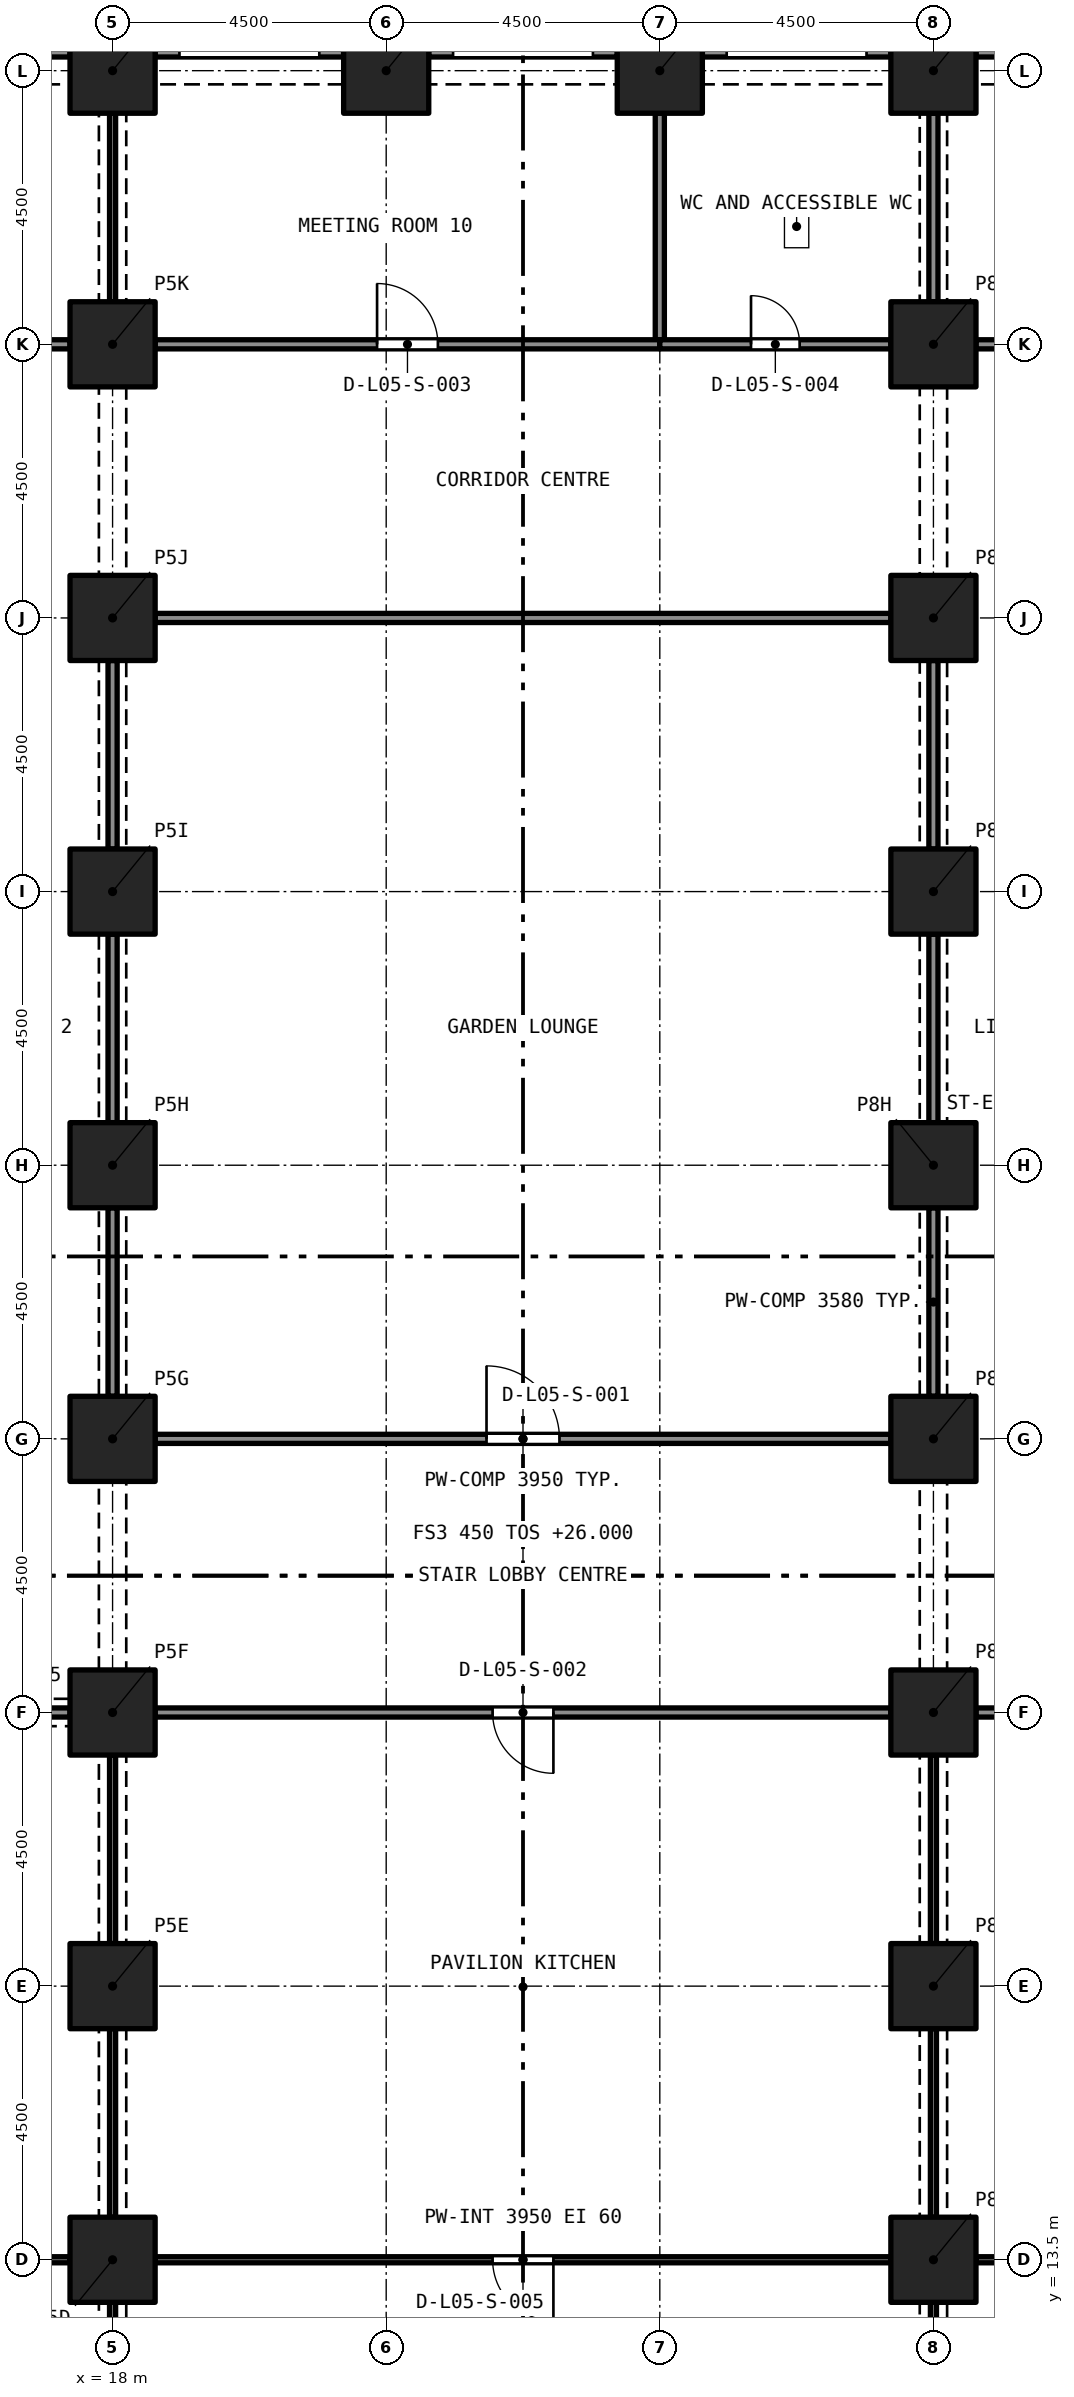
"""IFC4 building model, lengths in metres.
Left out: names, types, materials, properties, quantities, classifications, styles, units other than length and angle.
Written with IfcOpenShell. Run it as: python <this file> out.ifc"""

import sys

from ifc_helpers import new_model, si_unit, direction, frame, frame_2d, origin, origin_2d, place, context, subcontext, project, spatial, rectangle, extrude, element, fill, save


model = new_model("IFC4")
c1 = context("Model", 3, precision=1e-05, world=origin(), true_north=direction((0.0, 1.0)))
c2 = subcontext(c1, "Body", "Model", "MODEL_VIEW")
j1 = project(units=[si_unit("LENGTHUNIT", "METRE"), si_unit("PLANEANGLEUNIT", "RADIAN")], contexts=[c1])
p1 = place(None, origin())
s1 = spatial("IfcSite", under=j1, at=p1, CompositionType="ELEMENT")
p2 = place(p1, origin())
s2 = spatial("IfcBuilding", under=s1, at=p2, CompositionType="ELEMENT")
p3 = place(p2, frame((0.0, 0.0, 26.0)))
s3 = spatial("IfcBuildingStorey", under=s2, at=p3, CompositionType="ELEMENT", Elevation=26.0)
for number, where, z_axis, x_axis in (
    (1, (18.0, 13.5, 0.0), (0.0, 0.0, 1.0), (1.0, 0.0, 0.0)),
    (2, (31.5, 13.5, 0.0), (0.0, 0.0, 1.0), (1.0, 0.0, 0.0)),
    (3, (18.0, 18.0, 0.0), (0.0, 0.0, 1.0), (1.0, 0.0, 0.0)),
    (4, (31.5, 18.0, 0.0), (0.0, 0.0, 1.0), (1.0, 0.0, 0.0)),
    (5, (18.0, 22.5, 0.0), (0.0, 0.0, 1.0), (1.0, 0.0, 0.0)),
    (6, (31.5, 22.5, 0.0), (0.0, 0.0, 1.0), (1.0, 0.0, 0.0)),
    (7, (18.0, 27.0, 0.0), (0.0, 0.0, 1.0), (1.0, 0.0, 0.0)),
    (8, (31.5, 27.0, 0.0), (0.0, 0.0, 1.0), (1.0, 0.0, 0.0)),
    (9, (18.0, 31.5, 0.0), (0.0, 0.0, 1.0), (1.0, 0.0, 0.0)),
    (10, (31.5, 31.5, 0.0), (0.0, 0.0, 1.0), (1.0, 0.0, 0.0)),
    (11, (18.0, 36.0, 0.0), (0.0, 0.0, 1.0), (1.0, 0.0, 0.0)),
    (12, (31.5, 36.0, 0.0), (0.0, 0.0, 1.0), (1.0, 0.0, 0.0)),
    (13, (18.0, 40.5, 0.0), (0.0, 0.0, 1.0), (1.0, 0.0, 0.0)),
    (14, (31.5, 40.5, 0.0), (0.0, 0.0, 1.0), (1.0, 0.0, 0.0)),
    (15, (18.0, 45.0, 0.0), (0.0, 0.0, 1.0), (1.0, 0.0, 0.0)),
    (16, (31.5, 45.0, 0.0), (0.0, 0.0, 1.0), (1.0, 0.0, 0.0)),
    (17, (18.0, 49.5, 0.0), (0.0, 0.0, 1.0), (1.0, 0.0, 0.0)),
    (18, (22.5, 49.5, 0.0), (0.0, 0.0, 1.0), (1.0, 0.0, 0.0)),
    (19, (27.0, 49.5, 0.0), (0.0, 0.0, 1.0), (1.0, 0.0, 0.0)),
    (20, (31.5, 49.5, 0.0), (0.0, 0.0, 1.0), (1.0, 0.0, 0.0)),
):
    element("IfcColumn", number, at=place(p3, frame(where, z_axis=z_axis, x_axis=x_axis)), inside=s3, PredefinedType="COLUMN", context=c2, shape_type="SweptSolid", body=[
        extrude(rectangle(XDim=1.4, YDim=1.4, at=origin_2d()), origin(), (0.0, 0.0, 1.0), 4.4),
    ])
p4 = place(p3, frame((32.2, 49.875, 0.0), z_axis=(0.0, 0.0, 1.0), x_axis=(1.0, 0.0, 0.0)))
e21 = element("IfcWall", 21, at=p4, inside=s3, PredefinedType="SOLIDWALL", context=c2, shape_type="SweptSolid", body=[
    extrude(rectangle(XDim=3.1, YDim=0.3, at=frame_2d((1.55, 0.0))), origin(), (0.0, 0.0, 1.0), 4.4),
])
p5 = place(p4, frame((0.4, 0.0, 0.45)))
e22 = element("IfcOpeningElement", 22, at=p5, cuts=e21, PredefinedType="OPENING", context=c2, shape_type="SweptSolid", body=[
    extrude(rectangle(XDim=2.3, YDim=2.55, at=frame_2d((1.15, 1.275))), frame((0.0, 0.16, 0.0), z_axis=(0.0, -1.0, 0.0), x_axis=(1.0, 0.0, 0.0)), (0.0, 0.0, 1.0), 0.32),
])
p6 = place(p3, frame((27.7, 49.875, 0.0), z_axis=(0.0, 0.0, 1.0), x_axis=(1.0, 0.0, 0.0)))
e23 = element("IfcWall", 23, at=p6, inside=s3, PredefinedType="SOLIDWALL", context=c2, shape_type="SweptSolid", body=[
    extrude(rectangle(XDim=3.1, YDim=0.3, at=frame_2d((1.55, 0.0))), origin(), (0.0, 0.0, 1.0), 4.4),
])
p7 = place(p6, frame((0.4, 0.0, 0.45)))
e24 = element("IfcOpeningElement", 24, at=p7, cuts=e23, PredefinedType="OPENING", context=c2, shape_type="SweptSolid", body=[
    extrude(rectangle(XDim=2.3, YDim=2.55, at=frame_2d((1.15, 1.275))), frame((0.0, 0.16, 0.0), z_axis=(0.0, -1.0, 0.0), x_axis=(1.0, 0.0, 0.0)), (0.0, 0.0, 1.0), 0.32),
])
p8 = place(p3, frame((23.2, 49.875, 0.0), z_axis=(0.0, 0.0, 1.0), x_axis=(1.0, 0.0, 0.0)))
e25 = element("IfcWall", 25, at=p8, inside=s3, PredefinedType="SOLIDWALL", context=c2, shape_type="SweptSolid", body=[
    extrude(rectangle(XDim=3.1, YDim=0.3, at=frame_2d((1.55, 0.0))), origin(), (0.0, 0.0, 1.0), 4.4),
])
p9 = place(p8, frame((0.4, 0.0, 0.45)))
e26 = element("IfcOpeningElement", 26, at=p9, cuts=e25, PredefinedType="OPENING", context=c2, shape_type="SweptSolid", body=[
    extrude(rectangle(XDim=2.3, YDim=2.55, at=frame_2d((1.15, 1.275))), frame((0.0, 0.16, 0.0), z_axis=(0.0, -1.0, 0.0), x_axis=(1.0, 0.0, 0.0)), (0.0, 0.0, 1.0), 0.32),
])
p10 = place(p3, frame((18.7, 49.875, 0.0), z_axis=(0.0, 0.0, 1.0), x_axis=(1.0, 0.0, 0.0)))
e27 = element("IfcWall", 27, at=p10, inside=s3, PredefinedType="SOLIDWALL", context=c2, shape_type="SweptSolid", body=[
    extrude(rectangle(XDim=3.1, YDim=0.3, at=frame_2d((1.55, 0.0))), origin(), (0.0, 0.0, 1.0), 4.4),
])
p11 = place(p10, frame((0.4, 0.0, 0.45)))
e28 = element("IfcOpeningElement", 28, at=p11, cuts=e27, PredefinedType="OPENING", context=c2, shape_type="SweptSolid", body=[
    extrude(rectangle(XDim=2.3, YDim=2.55, at=frame_2d((1.15, 1.275))), frame((0.0, 0.16, 0.0), z_axis=(0.0, -1.0, 0.0), x_axis=(1.0, 0.0, 0.0)), (0.0, 0.0, 1.0), 0.32),
])
p12 = place(p3, frame((14.2, 49.875, 0.0), z_axis=(0.0, 0.0, 1.0), x_axis=(1.0, 0.0, 0.0)))
e29 = element("IfcWall", 29, at=p12, inside=s3, PredefinedType="SOLIDWALL", context=c2, shape_type="SweptSolid", body=[
    extrude(rectangle(XDim=3.1, YDim=0.3, at=frame_2d((1.55, 0.0))), origin(), (0.0, 0.0, 1.0), 4.4),
])
p13 = place(p12, frame((0.4, 0.0, 0.45)))
e30 = element("IfcOpeningElement", 30, at=p13, cuts=e29, PredefinedType="OPENING", context=c2, shape_type="SweptSolid", body=[
    extrude(rectangle(XDim=2.3, YDim=2.55, at=frame_2d((1.15, 1.275))), frame((0.0, 0.16, 0.0), z_axis=(0.0, -1.0, 0.0), x_axis=(1.0, 0.0, 0.0)), (0.0, 0.0, 1.0), 0.32),
])
p14 = place(p3, frame((18.7, 27.0, 0.0), z_axis=(0.0, 0.0, 1.0), x_axis=(1.0, 0.0, 0.0)))
e31 = element("IfcWall", 31, at=p14, inside=s3, PredefinedType="PARTITIONING", context=c2, shape_type="SweptSolid", body=[
    extrude(rectangle(XDim=12.1, YDim=0.15, at=frame_2d((6.05, 0.0))), origin(), (0.0, 0.0, 1.0), 3.95),
])
p15 = place(p14, frame((5.45, 0.0, 0.0)))
e32 = element("IfcOpeningElement", 32, at=p15, cuts=e31, PredefinedType="OPENING", context=c2, shape_type="SweptSolid", body=[
    extrude(rectangle(XDim=1.2, YDim=2.1, at=frame_2d((0.6, 1.05))), frame((0.0, 0.085, 0.0), z_axis=(0.0, -1.0, 0.0), x_axis=(1.0, 0.0, 0.0)), (0.0, 0.0, 1.0), 0.17),
])
p16 = place(p3, frame((30.8, 22.5, 0.0), z_axis=(0.0, 0.0, 1.0), x_axis=(-1.0, 0.0, 0.0)))
e33 = element("IfcWall", 33, at=p16, inside=s3, PredefinedType="PARTITIONING", context=c2, shape_type="SweptSolid", body=[
    extrude(rectangle(XDim=12.1, YDim=0.15, at=frame_2d((6.05, 0.0))), origin(), (0.0, 0.0, 1.0), 3.95),
])
p17 = place(p16, frame((5.55, 0.0, 0.0)))
e34 = element("IfcOpeningElement", 34, at=p17, cuts=e33, PredefinedType="OPENING", context=c2, shape_type="SweptSolid", body=[
    extrude(rectangle(XDim=1.0, YDim=2.1, at=frame_2d((0.5, 1.05))), frame((0.0, 0.085, 0.0), z_axis=(0.0, -1.0, 0.0), x_axis=(1.0, 0.0, 0.0)), (0.0, 0.0, 1.0), 0.17),
])
p18 = place(p3, frame((18.7, 40.5, 0.0), z_axis=(0.0, 0.0, 1.0), x_axis=(1.0, 0.0, 0.0)))
e35 = element("IfcWall", 35, at=p18, inside=s3, PredefinedType="PARTITIONING", context=c2, shape_type="SweptSolid", body=[
    extrude(rectangle(XDim=12.1, YDim=0.15, at=frame_2d((6.05, 0.0))), origin(), (0.0, 0.0, 1.0), 3.95),
])
for number, where, z_axis, x_axis in (
    (36, (31.5, 36.7, 0.0), (0.0, 0.0, 1.0), (0.0, 1.0, 0.0)),
    (37, (31.5, 32.2, 0.0), (0.0, 0.0, 1.0), (0.0, 1.0, 0.0)),
    (38, (31.5, 27.7, 0.0), (0.0, 0.0, 1.0), (0.0, 1.0, 0.0)),
    (39, (18.0, 27.7, 0.0), (0.0, 0.0, 1.0), (0.0, 1.0, 0.0)),
    (40, (18.0, 32.2, 0.0), (0.0, 0.0, 1.0), (0.0, 1.0, 0.0)),
    (41, (18.0, 36.7, 0.0), (0.0, 0.0, 1.0), (0.0, 1.0, 0.0)),
):
    element("IfcWall", number, at=place(p3, frame(where, z_axis=z_axis, x_axis=x_axis)), inside=s3, PredefinedType="PARTITIONING", context=c2, shape_type="SweptSolid", body=[
        extrude(rectangle(XDim=3.1, YDim=0.15, at=frame_2d((1.55, 0.0))), origin(), (0.0, 0.0, 1.0), 3.58),
    ])
p19 = place(p3, frame((27.0, 45.075, 0.0), z_axis=(0.0, 0.0, 1.0), x_axis=(0.0, 1.0, 0.0)))
e42 = element("IfcWall", 42, at=p19, inside=s3, PredefinedType="PARTITIONING", context=c2, shape_type="SweptSolid", body=[
    extrude(rectangle(XDim=3.725, YDim=0.15, at=frame_2d((1.863, 0.0))), origin(), (0.0, 0.0, 1.0), 3.95),
])
p20 = place(p3, frame((18.7, 45.0, 0.0), z_axis=(0.0, 0.0, 1.0), x_axis=(1.0, 0.0, 0.0)))
e43 = element("IfcWall", 43, at=p20, inside=s3, PredefinedType="PARTITIONING", context=c2, shape_type="SweptSolid", body=[
    extrude(rectangle(XDim=8.3, YDim=0.15, at=frame_2d((4.15, 0.0))), origin(), (0.0, 0.0, 1.0), 3.95),
])
p21 = place(p20, frame((3.65, 0.0, 0.0)))
e44 = element("IfcOpeningElement", 44, at=p21, cuts=e43, PredefinedType="OPENING", context=c2, shape_type="SweptSolid", body=[
    extrude(rectangle(XDim=1.0, YDim=2.1, at=frame_2d((0.5, 1.05))), frame((0.0, 0.085, 0.0), z_axis=(0.0, -1.0, 0.0), x_axis=(1.0, 0.0, 0.0)), (0.0, 0.0, 1.0), 0.17),
])
p22 = place(p3, frame((18.0, 45.7, 0.0), z_axis=(0.0, 0.0, 1.0), x_axis=(0.0, 1.0, 0.0)))
e45 = element("IfcWall", 45, at=p22, inside=s3, PredefinedType="PARTITIONING", context=c2, shape_type="SweptSolid", body=[
    extrude(rectangle(XDim=3.1, YDim=0.1, at=frame_2d((1.55, 0.0))), origin(), (0.0, 0.0, 1.0), 3.58),
])
p23 = place(p3, frame((27.0, 45.0, 0.0), z_axis=(0.0, 0.0, 1.0), x_axis=(1.0, 0.0, 0.0)))
e46 = element("IfcWall", 46, at=p23, inside=s3, PredefinedType="PARTITIONING", context=c2, shape_type="SweptSolid", body=[
    extrude(rectangle(XDim=3.8, YDim=0.15, at=frame_2d((1.9, 0.0))), origin(), (0.0, 0.0, 1.0), 3.95),
])
p24 = place(p23, frame((1.5, 0.0, 0.0)))
e47 = element("IfcOpeningElement", 47, at=p24, cuts=e46, PredefinedType="OPENING", context=c2, shape_type="SweptSolid", body=[
    extrude(rectangle(XDim=0.8, YDim=2.1, at=frame_2d((0.4, 1.05))), frame((0.0, 0.085, 0.0), z_axis=(0.0, -1.0, 0.0), x_axis=(1.0, 0.0, 0.0)), (0.0, 0.0, 1.0), 0.17),
])
p25 = place(p3, frame((31.5, 45.7, 0.0), z_axis=(0.0, 0.0, 1.0), x_axis=(0.0, 1.0, 0.0)))
e48 = element("IfcWall", 48, at=p25, inside=s3, PredefinedType="PARTITIONING", context=c2, shape_type="SweptSolid", body=[
    extrude(rectangle(XDim=3.1, YDim=0.15, at=frame_2d((1.55, 0.0))), origin(), (0.0, 0.0, 1.0), 3.58),
])
p26 = place(p3, frame((30.8, 13.5, 0.0), z_axis=(0.0, 0.0, 1.0), x_axis=(-1.0, 0.0, 0.0)))
e49 = element("IfcWall", 49, at=p26, inside=s3, PredefinedType="PARTITIONING", context=c2, shape_type="SweptSolid", body=[
    extrude(rectangle(XDim=12.1, YDim=0.1, at=frame_2d((6.05, 0.0))), origin(), (0.0, 0.0, 1.0), 3.95),
])
p27 = place(p26, frame((5.55, 0.0, 0.0)))
e50 = element("IfcOpeningElement", 50, at=p27, cuts=e49, PredefinedType="OPENING", context=c2, shape_type="SweptSolid", body=[
    extrude(rectangle(XDim=1.0, YDim=2.1, at=frame_2d((0.5, 1.05))), frame((0.0, 0.06, 0.0), z_axis=(0.0, -1.0, 0.0), x_axis=(1.0, 0.0, 0.0)), (0.0, 0.0, 1.0), 0.12),
])
for number, where, z_axis, x_axis in (
    (51, (31.5, 9.7, 0.0), (0.0, 0.0, 1.0), (0.0, 1.0, 0.0)),
    (52, (18.0, 9.7, 0.0), (0.0, 0.0, 1.0), (0.0, 1.0, 0.0)),
    (53, (31.5, 18.7, 0.0), (0.0, 0.0, 1.0), (0.0, 1.0, 0.0)),
    (54, (31.5, 14.2, 0.0), (0.0, 0.0, 1.0), (0.0, 1.0, 0.0)),
    (55, (18.0, 14.2, 0.0), (0.0, 0.0, 1.0), (0.0, 1.0, 0.0)),
    (56, (18.0, 18.7, 0.0), (0.0, 0.0, 1.0), (0.0, 1.0, 0.0)),
):
    element("IfcWall", number, at=place(p3, frame(where, z_axis=z_axis, x_axis=x_axis)), inside=s3, PredefinedType="PARTITIONING", context=c2, shape_type="SweptSolid", body=[
        extrude(rectangle(XDim=3.1, YDim=0.1, at=frame_2d((1.55, 0.0))), origin(), (0.0, 0.0, 1.0), 3.58),
    ])
p28 = place(p3, frame((40.575, 22.5, 0.0), z_axis=(0.0, 0.0, 1.0), x_axis=(-1.0, 0.0, 0.0)))
e57 = element("IfcWall", 57, at=p28, inside=s3, PredefinedType="PARTITIONING", context=c2, shape_type="SweptSolid", body=[
    extrude(rectangle(XDim=8.375, YDim=0.15, at=frame_2d((4.188, 0.0))), origin(), (0.0, 0.0, 1.0), 4.1),
])
p29 = place(p28, frame((3.725, 0.0, 0.0)))
e58 = element("IfcOpeningElement", 58, at=p29, cuts=e57, PredefinedType="OPENING", context=c2, shape_type="SweptSolid", body=[
    extrude(rectangle(XDim=1.0, YDim=2.1, at=frame_2d((0.5, 1.05))), frame((0.0, 0.085, 0.0), z_axis=(0.0, -1.0, 0.0), x_axis=(1.0, 0.0, 0.0)), (0.0, 0.0, 1.0), 0.17),
])
p30 = place(p3, frame((32.2, 45.0, 0.0), z_axis=(0.0, 0.0, 1.0), x_axis=(1.0, 0.0, 0.0)))
e59 = element("IfcWall", 59, at=p30, inside=s3, PredefinedType="PARTITIONING", context=c2, shape_type="SweptSolid", body=[
    extrude(rectangle(XDim=8.3, YDim=0.15, at=frame_2d((4.15, 0.0))), origin(), (0.0, 0.0, 1.0), 4.1),
])
p31 = place(p30, frame((3.65, 0.0, 0.0)))
e60 = element("IfcOpeningElement", 60, at=p31, cuts=e59, PredefinedType="OPENING", context=c2, shape_type="SweptSolid", body=[
    extrude(rectangle(XDim=1.0, YDim=2.1, at=frame_2d((0.5, 1.05))), frame((0.0, 0.085, 0.0), z_axis=(0.0, -1.0, 0.0), x_axis=(1.0, 0.0, 0.0)), (0.0, 0.0, 1.0), 0.17),
])
p32 = place(p3, frame((32.2, 13.5, 0.0), z_axis=(0.0, 0.0, 1.0), x_axis=(1.0, 0.0, 0.0)))
e61 = element("IfcWall", 61, at=p32, inside=s3, PredefinedType="PARTITIONING", context=c2, shape_type="SweptSolid", body=[
    extrude(rectangle(XDim=8.225, YDim=0.1, at=frame_2d((4.113, 0.0))), origin(), (0.0, 0.0, 1.0), 4.1),
])
p33 = place(p3, frame((17.3, 22.5, 0.0), z_axis=(0.0, 0.0, 1.0), x_axis=(-1.0, 0.0, 0.0)))
e62 = element("IfcWall", 62, at=p33, inside=s3, PredefinedType="PARTITIONING", context=c2, shape_type="SweptSolid", body=[
    extrude(rectangle(XDim=3.1, YDim=0.15, at=frame_2d((1.55, 0.0))), origin(), (0.0, 0.0, 1.0), 3.58),
])
p34 = place(p33, frame((1.05, 0.0, 0.0)))
e63 = element("IfcOpeningElement", 63, at=p34, cuts=e62, PredefinedType="OPENING", context=c2, shape_type="SweptSolid", body=[
    extrude(rectangle(XDim=1.0, YDim=2.1, at=frame_2d((0.5, 1.05))), frame((0.0, 0.085, 0.0), z_axis=(0.0, -1.0, 0.0), x_axis=(1.0, 0.0, 0.0)), (0.0, 0.0, 1.0), 0.17),
])
p35 = place(p3, frame((9.0, 45.0, 0.0), z_axis=(0.0, 0.0, 1.0), x_axis=(1.0, 0.0, 0.0)))
e64 = element("IfcWall", 64, at=p35, inside=s3, PredefinedType="PARTITIONING", context=c2, shape_type="SweptSolid", body=[
    extrude(rectangle(XDim=8.3, YDim=0.15, at=frame_2d((4.15, 0.0))), origin(), (0.0, 0.0, 1.0), 4.1),
])
p36 = place(p35, frame((3.65, 0.0, 0.0)))
e65 = element("IfcOpeningElement", 65, at=p36, cuts=e64, PredefinedType="OPENING", context=c2, shape_type="SweptSolid", body=[
    extrude(rectangle(XDim=1.0, YDim=2.1, at=frame_2d((0.5, 1.05))), frame((0.0, 0.085, 0.0), z_axis=(0.0, -1.0, 0.0), x_axis=(1.0, 0.0, 0.0)), (0.0, 0.0, 1.0), 0.17),
])
p37 = place(p3, frame((9.075, 13.5, 0.0), z_axis=(0.0, 0.0, 1.0), x_axis=(1.0, 0.0, 0.0)))
e66 = element("IfcWall", 66, at=p37, inside=s3, PredefinedType="PARTITIONING", context=c2, shape_type="SweptSolid", body=[
    extrude(rectangle(XDim=8.225, YDim=0.1, at=frame_2d((4.113, 0.0))), origin(), (0.0, 0.0, 1.0), 4.1),
])
p38 = place(p15, origin())
e67 = element("IfcDoor", 67, at=p38, inside=s3, OperationType="SINGLE_SWING_RIGHT", PredefinedType="DOOR", context=c2, shape_type="SweptSolid", body=[
    extrude(rectangle(XDim=1.2, YDim=2.1, at=frame_2d((0.6, 1.05))), frame((0.0, 0.025, 0.0), z_axis=(0.0, -1.0, 0.0), x_axis=(1.0, 0.0, 0.0)), (0.0, 0.0, 1.0), 0.05),
])
fill(e32, e67)
p39 = place(p17, origin())
e68 = element("IfcDoor", 68, at=p39, inside=s3, OperationType="SINGLE_SWING_RIGHT", PredefinedType="DOOR", context=c2, shape_type="SweptSolid", body=[
    extrude(rectangle(XDim=1.0, YDim=2.1, at=frame_2d((0.5, 1.05))), frame((0.0, 0.025, 0.0), z_axis=(0.0, -1.0, 0.0), x_axis=(1.0, 0.0, 0.0)), (0.0, 0.0, 1.0), 0.05),
])
fill(e34, e68)
p40 = place(p21, origin())
e69 = element("IfcDoor", 69, at=p40, inside=s3, OperationType="SINGLE_SWING_RIGHT", PredefinedType="DOOR", context=c2, shape_type="SweptSolid", body=[
    extrude(rectangle(XDim=1.0, YDim=2.1, at=frame_2d((0.5, 1.05))), frame((0.0, 0.025, 0.0), z_axis=(0.0, -1.0, 0.0), x_axis=(1.0, 0.0, 0.0)), (0.0, 0.0, 1.0), 0.05),
])
fill(e44, e69)
p41 = place(p24, origin())
e70 = element("IfcDoor", 70, at=p41, inside=s3, OperationType="SINGLE_SWING_RIGHT", PredefinedType="DOOR", context=c2, shape_type="SweptSolid", body=[
    extrude(rectangle(XDim=0.8, YDim=2.1, at=frame_2d((0.4, 1.05))), frame((0.0, 0.025, 0.0), z_axis=(0.0, -1.0, 0.0), x_axis=(1.0, 0.0, 0.0)), (0.0, 0.0, 1.0), 0.05),
])
fill(e47, e70)
p42 = place(p27, origin())
e71 = element("IfcDoor", 71, at=p42, inside=s3, OperationType="SINGLE_SWING_RIGHT", PredefinedType="DOOR", context=c2, shape_type="SweptSolid", body=[
    extrude(rectangle(XDim=1.0, YDim=2.1, at=frame_2d((0.5, 1.05))), frame((0.0, 0.025, 0.0), z_axis=(0.0, -1.0, 0.0), x_axis=(1.0, 0.0, 0.0)), (0.0, 0.0, 1.0), 0.05),
])
fill(e50, e71)
save(model, sys.argv[1])
